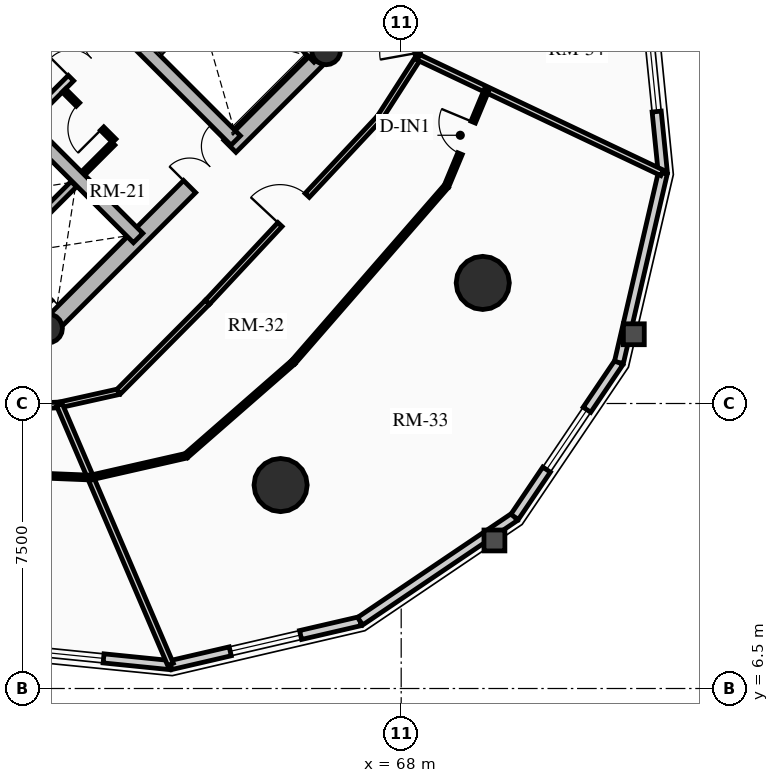
"""IFC4 building model, lengths in metres.
Left out: names, types, materials, properties, quantities, classifications, styles, units other than length and angle.
Written with IfcOpenShell. Run it as: python <this file> out.ifc"""

import sys

from ifc_helpers import new_model, si_unit, direction, frame, frame_2d, origin, origin_2d, place, context, subcontext, project, spatial, rectangle, circle, hollow_circle, extrude, source, transform, mapped, element, fill, save


model = new_model("IFC4")
c1 = context("Model", 3, precision=1e-05, world=origin(), true_north=direction((0.0, 1.0)))
c2 = subcontext(c1, "Body", "Model", "MODEL_VIEW")
j1 = project(units=[si_unit("LENGTHUNIT", "METRE"), si_unit("PLANEANGLEUNIT", "RADIAN")], contexts=[c1])
p1 = place(None, origin())
s1 = spatial("IfcSite", under=j1, at=p1, CompositionType="ELEMENT")
p2 = place(p1, origin())
s2 = spatial("IfcBuilding", under=s1, at=p2, CompositionType="ELEMENT")
p3 = place(p2, frame((0.0, 0.0, 107.98)))
s3 = spatial("IfcBuildingStorey", under=s2, at=p3, CompositionType="ELEMENT", Elevation=107.98)
for number, where, z_axis, x_axis in (
    (1, (58.737, 15.697, 0.0), (0.0, 0.0, 1.0), (-0.707, 0.707, 0.0)),
    (2, (66.303, 23.263, 0.0), (0.0, 0.0, 1.0), (-0.707, 0.707, 0.0)),
):
    element("IfcWall", number, at=place(p3, frame(where, z_axis=z_axis, x_axis=x_axis)), inside=s3, PredefinedType="SHEAR", context=c2, shape_type="SweptSolid", body=[
        extrude(rectangle(XDim=14.2, YDim=0.45, at=frame_2d((7.1, 0.0))), origin(), (0.0, 0.0, 1.0), 2.91),
    ])
p4 = place(p3, frame((58.578, 15.856, 0.0), z_axis=(0.0, 0.0, 1.0), x_axis=(0.707106781187, 0.707106781187, 0.0)))
e3 = element("IfcWall", 3, at=p4, inside=s3, PredefinedType="SHEAR", context=c2, shape_type="SweptSolid", body=[
    extrude(rectangle(XDim=10.7, YDim=0.45, at=frame_2d((5.35, 0.0))), origin(), (0.0, 0.0, 1.0), 2.91),
])
m1 = source(origin(), c2, "Body", "SweptSolid", [
    extrude(rectangle(XDim=1.5, YDim=2.02, at=frame_2d((0.75, 1.01))), frame((0.0, 0.235, 0.0), z_axis=(0.0, -1.0, 0.0), x_axis=(1.0, 0.0, 0.0)), (0.0, 0.0, 1.0), 0.47),
])
p5 = place(p4, frame((5.45, 0.0, 0.0)))
e4 = element("IfcOpeningElement", 4, at=p5, cuts=e3, PredefinedType="OPENING", context=c2, shape_type="MappedRepresentation", body=[
    mapped(m1, transform((0.0, 0.0, 0.0), x_axis=(1.0, 0.0, 0.0), y_axis=(0.0, 1.0, 0.0), z_axis=(0.0, 0.0, 1.0), scale=1.0)),
])
p6 = place(p3, frame((61.078, 18.355, 0.0), z_axis=(0.0, 0.0, 1.0), x_axis=(-0.707106781187, 0.707106781187, 0.0)))
e5 = element("IfcWall", 5, at=p6, inside=s3, PredefinedType="SHEAR", context=c2, shape_type="SweptSolid", body=[
    extrude(rectangle(XDim=13.75, YDim=0.35, at=frame_2d((6.875, 0.0))), origin(), (0.0, 0.0, 1.0), 2.91),
])
m2 = source(origin(), c2, "Body", "SweptSolid", [
    extrude(rectangle(XDim=1.1, YDim=2.015, at=frame_2d((0.55, 1.007))), frame((0.0, 0.185, 0.0), z_axis=(0.0, -1.0, 0.0), x_axis=(1.0, 0.0, 0.0)), (0.0, 0.0, 1.0), 0.37),
])
p7 = place(p6, frame((4.875, 0.0, 0.0)))
e6 = element("IfcOpeningElement", 6, at=p7, cuts=e5, PredefinedType="OPENING", context=c2, shape_type="MappedRepresentation", body=[
    mapped(m2, transform((0.0, 0.0, 0.0), x_axis=(1.0, 0.0, 0.0), y_axis=(0.0, 1.0, 0.0), z_axis=(0.0, 0.0, 1.0), scale=1.0)),
])
m3 = source(origin(), c2, "Body", "SweptSolid", [
    extrude(rectangle(XDim=1.15, YDim=2.02, at=frame_2d((0.575, 1.01))), frame((0.0, 0.185, 0.0), z_axis=(0.0, -1.0, 0.0), x_axis=(1.0, 0.0, 0.0)), (0.0, 0.0, 1.0), 0.37),
])
p8 = place(p6, frame((7.295, 0.0, 0.0)))
e7 = element("IfcOpeningElement", 7, at=p8, cuts=e5, PredefinedType="OPENING", context=c2, shape_type="MappedRepresentation", body=[
    mapped(m3, transform((0.0, 0.0, 0.0), x_axis=(1.0, 0.0, 0.0), y_axis=(0.0, 1.0, 0.0), z_axis=(0.0, 0.0, 1.0), scale=1.0)),
])
p9 = place(p3, frame((63.645, 20.922, 0.0), z_axis=(0.0, 0.0, 1.0), x_axis=(-0.707106781187, 0.707106781187, 0.0)))
e8 = element("IfcWall", 8, at=p9, inside=s3, PredefinedType="SHEAR", context=c2, shape_type="SweptSolid", body=[
    extrude(rectangle(XDim=13.75, YDim=0.35, at=frame_2d((6.875, 0.0))), origin(), (0.0, 0.0, 1.0), 2.91),
])
p10 = place(p9, frame((10.0, 0.0, 0.0)))
e9 = element("IfcOpeningElement", 9, at=p10, cuts=e8, PredefinedType="OPENING", context=c2, shape_type="MappedRepresentation", body=[
    mapped(m2, transform((0.0, 0.0, 0.0), x_axis=(1.0, 0.0, 0.0), y_axis=(0.0, 1.0, 0.0), z_axis=(0.0, 0.0, 1.0), scale=1.0)),
])
p11 = place(p9, frame((12.0, 0.0, 0.0)))
e10 = element("IfcOpeningElement", 10, at=p11, cuts=e8, PredefinedType="OPENING", context=c2, shape_type="MappedRepresentation", body=[
    mapped(m2, transform((0.0, 0.0, 0.0), x_axis=(1.0, 0.0, 0.0), y_axis=(0.0, 1.0, 0.0), z_axis=(0.0, 0.0, 1.0), scale=1.0)),
])
p12 = place(p9, frame((5.305, 0.0, 0.0)))
e11 = element("IfcOpeningElement", 11, at=p12, cuts=e8, PredefinedType="OPENING", context=c2, shape_type="MappedRepresentation", body=[
    mapped(m3, transform((0.0, 0.0, 0.0), x_axis=(1.0, 0.0, 0.0), y_axis=(0.0, 1.0, 0.0), z_axis=(0.0, 0.0, 1.0), scale=1.0)),
])
p13 = place(p3, frame((65.83, 23.107, 0.0), z_axis=(0.0, 0.0, 1.0), x_axis=(-0.707088616009, 0.707124945897, 0.0)))
e12 = element("IfcWall", 12, at=p13, inside=s3, PredefinedType="SHEAR", context=c2, shape_type="SweptSolid", body=[
    extrude(rectangle(XDim=6.72, YDim=0.35, at=frame_2d((3.36, 0.0))), origin(), (0.0, 0.0, 1.0), 2.91),
])
for number, where, z_axis, x_axis in (
    (13, (58.706, 15.976, 0.0), (0.0, 0.0, 1.0), (0.707, 0.707, 0.0)),
    (14, (66.024, 23.294, 0.0), (0.0, 0.0, 1.0), (0.707, 0.707, 0.0)),
):
    element("IfcColumn", number, at=place(p3, frame(where, z_axis=z_axis, x_axis=x_axis)), inside=s3, PredefinedType="COLUMN", context=c2, shape_type="SweptSolid", body=[
        extrude(hollow_circle(Radius=0.38, WallThickness=0.032, at=origin_2d()), origin(), (0.0, 0.0, 1.0), 2.91),
    ])
for number, where, z_axis, x_axis in (
    (15, (64.827, 11.854, 0.0), (0.0, 0.0, 1.0), (1.0, 0.0, 0.0)),
    (16, (70.146, 17.173, 0.0), (0.0, 0.0, 1.0), (1.0, 0.0, 0.0)),
):
    element("IfcColumn", number, at=place(p3, frame(where, z_axis=z_axis, x_axis=x_axis)), inside=s3, PredefinedType="USERDEFINED", context=c2, shape_type="SweptSolid", body=[
        extrude(circle(Radius=0.7, at=origin_2d()), origin(), (0.0, 0.0, 1.0), 2.91),
    ])
p14 = place(p3, frame((61.933, 7.115, 0.0), z_axis=(0.0, 0.0, 1.0), x_axis=(-0.994971754311, 0.10015591906, 0.0)))
e17 = element("IfcWall", 17, at=p14, inside=s3, PredefinedType="SOLIDWALL", context=c2, shape_type="SweptSolid", body=[
    extrude(rectangle(XDim=5.448, YDim=0.24, at=frame_2d((2.724, 0.0))), origin(), (0.0, 0.0, 1.0), 2.179),
])
m4 = source(origin(), c2, "Body", "SweptSolid", [
    extrude(rectangle(XDim=1.9, YDim=1.35, at=frame_2d((0.95, 0.675))), frame((0.0, 0.13, 0.0), z_axis=(0.0, -1.0, 0.0), x_axis=(1.0, 0.0, 0.0)), (0.0, 0.0, 1.0), 0.26),
])
p15 = place(p14, frame((1.774, 0.0, 0.65)))
e18 = element("IfcOpeningElement", 18, at=p15, cuts=e17, PredefinedType="OPENING", context=c2, shape_type="MappedRepresentation", body=[
    mapped(m4, transform((0.0, 0.0, 0.0), x_axis=(1.0, 0.0, 0.0), y_axis=(0.0, 1.0, 0.0), z_axis=(0.0, 0.0, 1.0), scale=1.0)),
])
p16 = place(p3, frame((66.92, 8.271, 0.0), z_axis=(0.0, 0.0, 1.0), x_axis=(-0.974165631126, -0.225834725257, 0.0)))
e19 = element("IfcWall", 19, at=p16, inside=s3, PredefinedType="SOLIDWALL", context=c2, shape_type="SweptSolid", body=[
    extrude(rectangle(XDim=5.119, YDim=0.24, at=frame_2d((2.56, 0.0))), origin(), (0.0, 0.0, 1.0), 2.179),
])
p17 = place(p16, frame((1.609, 0.0, 0.65)))
e20 = element("IfcOpeningElement", 20, at=p17, cuts=e19, PredefinedType="OPENING", context=c2, shape_type="MappedRepresentation", body=[
    mapped(m4, transform((0.0, 0.0, 0.0), x_axis=(1.0, 0.0, 0.0), y_axis=(0.0, 1.0, 0.0), z_axis=(0.0, 0.0, 1.0), scale=1.0)),
])
p18 = place(p3, frame((70.985, 11.015, 0.0), z_axis=(0.0, 0.0, 1.0), x_axis=(-0.828781148131, -0.559572880421, 0.0)))
e21 = element("IfcWall", 21, at=p18, inside=s3, PredefinedType="SOLIDWALL", context=c2, shape_type="SweptSolid", body=[
    extrude(rectangle(XDim=4.905, YDim=0.24, at=frame_2d((2.452, 0.0))), origin(), (0.0, 0.0, 1.0), 2.179),
])
p19 = place(p3, frame((73.729, 15.08, 0.0), z_axis=(0.0, 0.0, 1.0), x_axis=(-0.559572880421, -0.828781148131, 0.0)))
e22 = element("IfcWall", 22, at=p19, inside=s3, PredefinedType="SOLIDWALL", context=c2, shape_type="SweptSolid", body=[
    extrude(rectangle(XDim=4.905, YDim=0.24, at=frame_2d((2.452, 0.0))), origin(), (0.0, 0.0, 1.0), 2.179),
])
p20 = place(p19, frame((1.502, 0.0, 0.65)))
e23 = element("IfcOpeningElement", 23, at=p20, cuts=e22, PredefinedType="OPENING", context=c2, shape_type="MappedRepresentation", body=[
    mapped(m4, transform((0.0, 0.0, 0.0), x_axis=(1.0, 0.0, 0.0), y_axis=(0.0, 1.0, 0.0), z_axis=(0.0, 0.0, 1.0), scale=1.0)),
])
p21 = place(p3, frame((74.885, 20.067, 0.0), z_axis=(0.0, 0.0, 1.0), x_axis=(-0.225834725257, -0.974165631126, 0.0)))
e24 = element("IfcWall", 24, at=p21, inside=s3, PredefinedType="SOLIDWALL", context=c2, shape_type="SweptSolid", body=[
    extrude(rectangle(XDim=5.119, YDim=0.24, at=frame_2d((2.56, 0.0))), origin(), (0.0, 0.0, 1.0), 2.179),
])
p22 = place(p3, frame((74.339, 25.487, 0.0), z_axis=(0.0, 0.0, 1.0), x_axis=(0.10015591906, -0.994971754311, 0.0)))
e25 = element("IfcWall", 25, at=p22, inside=s3, PredefinedType="SOLIDWALL", context=c2, shape_type="SweptSolid", body=[
    extrude(rectangle(XDim=5.448, YDim=0.24, at=frame_2d((2.724, 0.0))), origin(), (0.0, 0.0, 1.0), 2.179),
])
m5 = source(origin(), c2, "Body", "SweptSolid", [
    extrude(rectangle(XDim=2.2, YDim=1.35, at=frame_2d((1.1, 0.675))), frame((0.0, 0.13, 0.0), z_axis=(0.0, -1.0, 0.0), x_axis=(1.0, 0.0, 0.0)), (0.0, 0.0, 1.0), 0.26),
])
p23 = place(p22, frame((1.624, 0.0, 0.65)))
e26 = element("IfcOpeningElement", 26, at=p23, cuts=e25, PredefinedType="OPENING", context=c2, shape_type="MappedRepresentation", body=[
    mapped(m5, transform((0.0, 0.0, 0.0), x_axis=(1.0, 0.0, 0.0), y_axis=(0.0, 1.0, 0.0), z_axis=(0.0, 0.0, 1.0), scale=1.0)),
])
p24 = place(p3, frame((57.284, 17.673, 0.0), z_axis=(0.0, 0.0, 1.0), x_axis=(0.707147878904, 0.70706568108, 0.0)))
e27 = element("IfcWall", 27, at=p24, inside=s3, PredefinedType="SHEAR", context=c2, shape_type="SweptSolid", body=[
    extrude(rectangle(XDim=2.97, YDim=0.2, at=frame_2d((1.485, 0.0))), origin(), (0.0, 0.0, 1.0), 2.91),
])
p25 = place(p3, frame((58.214, 21.467, 0.0), z_axis=(0.0, 0.0, 1.0), x_axis=(0.707106781187, 0.707106781187, 0.0)))
e28 = element("IfcWall", 28, at=p25, inside=s3, PredefinedType="PARTITIONING", context=c2, shape_type="SweptSolid", body=[
    extrude(rectangle(XDim=3.28, YDim=0.2, at=frame_2d((1.64, 0.0))), origin(), (0.0, 0.0, 1.0), 2.655),
])
m6 = source(origin(), c2, "Body", "SweptSolid", [
    extrude(rectangle(XDim=1.5, YDim=2.02, at=frame_2d((0.75, 1.01))), frame((0.0, 0.11, 0.0), z_axis=(0.0, -1.0, 0.0), x_axis=(1.0, 0.0, 0.0)), (0.0, 0.0, 1.0), 0.22),
])
p26 = place(p25, frame((1.55, 0.0, 0.0)))
e29 = element("IfcOpeningElement", 29, at=p26, cuts=e28, PredefinedType="OPENING", context=c2, shape_type="MappedRepresentation", body=[
    mapped(m6, transform((0.0, 0.0, 0.0), x_axis=(1.0, 0.0, 0.0), y_axis=(0.0, 1.0, 0.0), z_axis=(0.0, 0.0, 1.0), scale=1.0)),
])
p27 = place(p3, frame((60.448, 20.915, 0.0), z_axis=(0.0, 0.0, 1.0), x_axis=(-0.707106781187, 0.707106781187, 0.0)))
e30 = element("IfcWall", 30, at=p27, inside=s3, PredefinedType="PARTITIONING", context=c2, shape_type="SweptSolid", body=[
    extrude(rectangle(XDim=1.87, YDim=0.125, at=frame_2d((0.935, 0.0))), origin(), (0.0, 0.0, 1.0), 2.655),
])
m7 = source(origin(), c2, "Body", "SweptSolid", [
    extrude(rectangle(XDim=0.9, YDim=2.005, at=frame_2d((0.45, 1.002))), frame((0.0, 0.073, 0.0), z_axis=(0.0, -1.0, 0.0), x_axis=(1.0, 0.0, 0.0)), (0.0, 0.0, 1.0), 0.145),
])
p28 = place(p27, frame((0.45, 0.0, 0.0)))
e31 = element("IfcOpeningElement", 31, at=p28, cuts=e30, PredefinedType="OPENING", context=c2, shape_type="MappedRepresentation", body=[
    mapped(m7, transform((0.0, 0.0, 0.0), x_axis=(1.0, 0.0, 0.0), y_axis=(0.0, 1.0, 0.0), z_axis=(0.0, 0.0, 1.0), scale=1.0)),
])
p29 = place(p3, frame((59.643, 20.066, 0.0), z_axis=(0.0, 0.0, 1.0), x_axis=(0.707106781187, 0.707106781187, 0.0)))
e32 = element("IfcWall", 32, at=p29, inside=s3, PredefinedType="PARTITIONING", context=c2, shape_type="SweptSolid", body=[
    extrude(rectangle(XDim=1.1, YDim=0.125, at=frame_2d((0.55, 0.0))), origin(), (0.0, 0.0, 1.0), 2.655),
])
p30 = place(p3, frame((57.511, 13.897, 0.0), z_axis=(0.0, 0.0, 1.0), x_axis=(0.999024538494, 0.044158481476, 0.0)))
e33 = element("IfcWall", 33, at=p30, inside=s3, PredefinedType="PARTITIONING", context=c2, shape_type="SweptSolid", body=[
    extrude(rectangle(XDim=1.498, YDim=0.15, at=frame_2d((0.749, 0.0))), origin(), (0.0, 0.0, 1.0), 2.225),
])
p31 = place(p3, frame((59.008, 13.963, 0.0), z_axis=(0.0, 0.0, 1.0), x_axis=(0.976020856791, 0.21767702476, 0.0)))
e34 = element("IfcWall", 34, at=p31, inside=s3, PredefinedType="PARTITIONING", context=c2, shape_type="SweptSolid", body=[
    extrude(rectangle(XDim=1.593, YDim=0.15, at=frame_2d((0.796, 0.0))), origin(), (0.0, 0.0, 1.0), 2.225),
])
p32 = place(p3, frame((60.562, 14.31, 0.0), z_axis=(0.0, 0.0, 1.0), x_axis=(0.704566236161, 0.709638230975, 0.0)))
e35 = element("IfcWall", 35, at=p32, inside=s3, PredefinedType="PARTITIONING", context=c2, shape_type="SweptSolid", body=[
    extrude(rectangle(XDim=3.321, YDim=0.15, at=frame_2d((1.661, 0.0))), origin(), (0.0, 0.0, 1.0), 2.225),
])
p33 = place(p3, frame((62.903, 16.667, 0.0), z_axis=(0.0, 0.0, 1.0), x_axis=(0.682371947497, 0.731005147225, 0.0)))
e36 = element("IfcWall", 36, at=p33, inside=s3, PredefinedType="PARTITIONING", context=c2, shape_type="SweptSolid", body=[
    extrude(rectangle(XDim=6.642, YDim=0.15, at=frame_2d((3.321, 0.0))), origin(), (0.0, 0.0, 1.0), 2.225),
])
m8 = source(origin(), c2, "Body", "SweptSolid", [
    extrude(rectangle(XDim=1.05, YDim=2.015, at=frame_2d((0.525, 1.007))), frame((0.0, 0.085, 0.0), z_axis=(0.0, -1.0, 0.0), x_axis=(1.0, 0.0, 0.0)), (0.0, 0.0, 1.0), 0.17),
])
p34 = place(p33, frame((2.796, 0.0, 0.0)))
e37 = element("IfcOpeningElement", 37, at=p34, cuts=e36, PredefinedType="OPENING", context=c2, shape_type="MappedRepresentation", body=[
    mapped(m8, transform((0.0, 0.0, 0.0), x_axis=(1.0, 0.0, 0.0), y_axis=(0.0, 1.0, 0.0), z_axis=(0.0, 0.0, 1.0), scale=1.0)),
])
p35 = place(p3, frame((67.435, 21.521, 0.0), z_axis=(0.0, 0.0, 1.0), x_axis=(0.540777197838, 0.841165870859, 0.0)))
e38 = element("IfcWall", 38, at=p35, inside=s3, PredefinedType="PARTITIONING", context=c2, shape_type="SweptSolid", body=[
    extrude(rectangle(XDim=1.888, YDim=0.15, at=frame_2d((0.944, 0.0))), origin(), (0.0, 0.0, 1.0), 2.225),
])
p36 = place(p3, frame((68.456, 23.11, 0.0), z_axis=(0.0, 0.0, 1.0), x_axis=(-0.1772522795, 0.984165448191, 0.0)))
e39 = element("IfcWall", 39, at=p36, inside=s3, PredefinedType="PARTITIONING", context=c2, shape_type="SweptSolid", body=[
    extrude(rectangle(XDim=1.382, YDim=0.15, at=frame_2d((0.691, 0.0))), origin(), (0.0, 0.0, 1.0), 2.225),
])
m9 = source(origin(), c2, "Body", "SweptSolid", [
    extrude(rectangle(XDim=1.0, YDim=2.015, at=frame_2d((0.5, 1.007))), frame((0.0, 0.085, 0.0), z_axis=(0.0, -1.0, 0.0), x_axis=(1.0, 0.0, 0.0)), (0.0, 0.0, 1.0), 0.17),
])
p37 = place(p36, frame((0.12, 0.0, 0.0)))
e40 = element("IfcOpeningElement", 40, at=p37, cuts=e39, PredefinedType="OPENING", context=c2, shape_type="MappedRepresentation", body=[
    mapped(m9, transform((0.0, 0.0, 0.0), x_axis=(1.0, 0.0, 0.0), y_axis=(0.0, 1.0, 0.0), z_axis=(0.0, 0.0, 1.0), scale=1.0)),
])
p38 = place(p3, frame((59.008, 13.963, 0.0), z_axis=(0.0, 0.0, 1.0), x_axis=(0.393439207333, -0.919350635032, 0.0)))
e41 = element("IfcWall", 41, at=p38, inside=s3, PredefinedType="PARTITIONING", context=c2, shape_type="SweptSolid", body=[
    extrude(rectangle(XDim=7.427, YDim=0.16, at=frame_2d((3.713, 0.0))), origin(), (0.0, 0.0, 1.0), 2.179),
])
p39 = place(p3, frame((68.456, 23.11, 0.0), z_axis=(0.0, 0.0, 1.0), x_axis=(0.903539425667, -0.428504966442, 0.0)))
e42 = element("IfcWall", 42, at=p39, inside=s3, PredefinedType="PARTITIONING", context=c2, shape_type="SweptSolid", body=[
    extrude(rectangle(XDim=7.094, YDim=0.16, at=frame_2d((3.547, 0.0))), origin(), (0.0, 0.0, 1.0), 2.179),
])
p40 = place(p3, frame((57.233, 12.156, 0.0), z_axis=(0.0, 0.0, 1.0), x_axis=(0.999181916557, -0.040441286156, 0.0)))
e43 = element("IfcWall", 43, at=p40, inside=s3, PredefinedType="PARTITIONING", context=c2, shape_type="SweptSolid", body=[
    extrude(rectangle(XDim=2.596, YDim=0.125, at=frame_2d((1.298, 0.0))), origin(), (0.0, 0.0, 1.0), 2.655),
])
p41 = place(p3, frame((59.826, 12.051, 0.0), z_axis=(0.0, 0.0, 1.0), x_axis=(0.975009915085, 0.222161350116, 0.0)))
e44 = element("IfcWall", 44, at=p41, inside=s3, PredefinedType="PARTITIONING", context=c2, shape_type="SweptSolid", body=[
    extrude(rectangle(XDim=2.578, YDim=0.125, at=frame_2d((1.289, 0.0))), origin(), (0.0, 0.0, 1.0), 2.225),
])
p42 = place(p3, frame((62.34, 12.624, 0.0), z_axis=(0.0, 0.0, 1.0), x_axis=(0.753169839919, 0.657826110941, 0.0)))
e45 = element("IfcWall", 45, at=p42, inside=s3, PredefinedType="PARTITIONING", context=c2, shape_type="SweptSolid", body=[
    extrude(rectangle(XDim=3.746, YDim=0.125, at=frame_2d((1.873, 0.0))), origin(), (0.0, 0.0, 1.0), 2.225),
])
p43 = place(p3, frame((65.162, 15.088, 0.0), z_axis=(0.0, 0.0, 1.0), x_axis=(0.656379509785, 0.754430871011, 0.0)))
e46 = element("IfcWall", 46, at=p43, inside=s3, PredefinedType="PARTITIONING", context=c2, shape_type="SweptSolid", body=[
    extrude(rectangle(XDim=6.14, YDim=0.125, at=frame_2d((3.07, 0.0))), origin(), (0.0, 0.0, 1.0), 2.225),
])
p44 = place(p3, frame((69.192, 19.72, 0.0), z_axis=(0.0, 0.0, 1.0), x_axis=(0.384899070029, 0.922958669655, 0.0)))
e47 = element("IfcWall", 47, at=p44, inside=s3, PredefinedType="PARTITIONING", context=c2, shape_type="SweptSolid", body=[
    extrude(rectangle(XDim=2.75, YDim=0.125, at=frame_2d((1.375, 0.0))), origin(), (0.0, 0.0, 1.0), 2.179),
])
p45 = place(p44, frame((0.925, 0.0, 0.0)))
e48 = element("IfcOpeningElement", 48, at=p45, cuts=e47, PredefinedType="OPENING", context=c2, shape_type="MappedRepresentation", body=[
    mapped(m7, transform((0.0, 0.0, 0.0), x_axis=(1.0, 0.0, 0.0), y_axis=(0.0, 1.0, 0.0), z_axis=(0.0, 0.0, 1.0), scale=1.0)),
])
m10 = source(origin(), c2, "Body", "SweptSolid", [
    extrude(rectangle(XDim=1.9, YDim=1.35, at=frame_2d((0.95, 0.675))), frame((0.0, 0.03, 0.0), z_axis=(0.0, -1.0, 0.0), x_axis=(1.0, 0.0, 0.0)), (0.0, 0.0, 1.0), 0.06),
])
p46 = place(p15, origin())
e49 = element("IfcWindow", 49, at=p46, inside=s3, PartitioningType="DOUBLE_PANEL_VERTICAL", PredefinedType="WINDOW", context=c2, shape_type="MappedRepresentation", body=[
    mapped(m10, transform((0.0, 0.0, 0.0), x_axis=(1.0, 0.0, 0.0), y_axis=(0.0, 1.0, 0.0), z_axis=(0.0, 0.0, 1.0), scale=1.0)),
])
fill(e18, e49)
p47 = place(p17, origin())
e50 = element("IfcWindow", 50, at=p47, inside=s3, PartitioningType="DOUBLE_PANEL_VERTICAL", PredefinedType="WINDOW", context=c2, shape_type="MappedRepresentation", body=[
    mapped(m10, transform((0.0, 0.0, 0.0), x_axis=(1.0, 0.0, 0.0), y_axis=(0.0, 1.0, 0.0), z_axis=(0.0, 0.0, 1.0), scale=1.0)),
])
fill(e20, e50)
p48 = place(p20, origin())
e51 = element("IfcWindow", 51, at=p48, inside=s3, PartitioningType="DOUBLE_PANEL_VERTICAL", PredefinedType="WINDOW", context=c2, shape_type="MappedRepresentation", body=[
    mapped(m10, transform((0.0, 0.0, 0.0), x_axis=(1.0, 0.0, 0.0), y_axis=(0.0, 1.0, 0.0), z_axis=(0.0, 0.0, 1.0), scale=1.0)),
])
fill(e23, e51)
m11 = source(origin(), c2, "Body", "SweptSolid", [
    extrude(rectangle(XDim=2.2, YDim=1.35, at=frame_2d((1.1, 0.675))), frame((0.0, 0.03, 0.0), z_axis=(0.0, -1.0, 0.0), x_axis=(1.0, 0.0, 0.0)), (0.0, 0.0, 1.0), 0.06),
])
p49 = place(p23, origin())
e52 = element("IfcWindow", 52, at=p49, inside=s3, PartitioningType="DOUBLE_PANEL_VERTICAL", PredefinedType="WINDOW", context=c2, shape_type="MappedRepresentation", body=[
    mapped(m11, transform((0.0, 0.0, 0.0), x_axis=(1.0, 0.0, 0.0), y_axis=(0.0, 1.0, 0.0), z_axis=(0.0, 0.0, 1.0), scale=1.0)),
])
fill(e26, e52)
m12 = source(origin(), c2, "Body", "SweptSolid", [
    extrude(rectangle(XDim=1.5, YDim=2.02, at=frame_2d((0.75, 1.01))), frame((0.0, 0.025, 0.0), z_axis=(0.0, -1.0, 0.0), x_axis=(1.0, 0.0, 0.0)), (0.0, 0.0, 1.0), 0.05),
])
p50 = place(p5, origin())
e53 = element("IfcDoor", 53, at=p50, inside=s3, OperationType="DOUBLE_DOOR_SINGLE_SWING", PredefinedType="DOOR", context=c2, shape_type="MappedRepresentation", body=[
    mapped(m12, transform((0.0, 0.0, 0.0), x_axis=(1.0, 0.0, 0.0), y_axis=(0.0, 1.0, 0.0), z_axis=(0.0, 0.0, 1.0), scale=1.0)),
])
fill(e4, e53)
p51 = place(p26, origin())
e54 = element("IfcDoor", 54, at=p51, inside=s3, OperationType="DOUBLE_DOOR_SINGLE_SWING", PredefinedType="DOOR", context=c2, shape_type="MappedRepresentation", body=[
    mapped(m12, transform((0.0, 0.0, 0.0), x_axis=(1.0, 0.0, 0.0), y_axis=(0.0, 1.0, 0.0), z_axis=(0.0, 0.0, 1.0), scale=1.0)),
])
fill(e29, e54)
m13 = source(origin(), c2, "Body", "SweptSolid", [
    extrude(rectangle(XDim=0.9, YDim=2.005, at=frame_2d((0.45, 1.002))), frame((0.0, 0.025, 0.0), z_axis=(0.0, -1.0, 0.0), x_axis=(1.0, 0.0, 0.0)), (0.0, 0.0, 1.0), 0.05),
])
p52 = place(p28, origin())
e55 = element("IfcDoor", 55, at=p52, inside=s3, OperationType="SINGLE_SWING_LEFT", PredefinedType="DOOR", context=c2, shape_type="MappedRepresentation", body=[
    mapped(m13, transform((0.0, 0.0, 0.0), x_axis=(1.0, 0.0, 0.0), y_axis=(0.0, 1.0, 0.0), z_axis=(0.0, 0.0, 1.0), scale=1.0)),
])
fill(e31, e55)
m14 = source(origin(), c2, "Body", "SweptSolid", [
    extrude(rectangle(XDim=1.05, YDim=2.015, at=frame_2d((0.525, 1.007))), frame((0.0, 0.025, 0.0), z_axis=(0.0, -1.0, 0.0), x_axis=(1.0, 0.0, 0.0)), (0.0, 0.0, 1.0), 0.05),
])
p53 = place(p34, origin())
e56 = element("IfcDoor", 56, at=p53, inside=s3, OperationType="SINGLE_SWING_LEFT", PredefinedType="DOOR", context=c2, shape_type="MappedRepresentation", body=[
    mapped(m14, transform((0.0, 0.0, 0.0), x_axis=(1.0, 0.0, 0.0), y_axis=(0.0, 1.0, 0.0), z_axis=(0.0, 0.0, 1.0), scale=1.0)),
])
fill(e37, e56)
p54 = place(p45, origin())
e57 = element("IfcDoor", 57, at=p54, inside=s3, OperationType="SINGLE_SWING_RIGHT", PredefinedType="DOOR", context=c2, shape_type="MappedRepresentation", body=[
    mapped(m13, transform((0.0, 0.0, 0.0), x_axis=(1.0, 0.0, 0.0), y_axis=(0.0, 1.0, 0.0), z_axis=(0.0, 0.0, 1.0), scale=1.0)),
])
fill(e48, e57)
m15 = source(origin(), c2, "Body", "SweptSolid", [
    extrude(rectangle(XDim=1.0, YDim=2.015, at=frame_2d((0.5, 1.007))), frame((0.0, 0.025, 0.0), z_axis=(0.0, -1.0, 0.0), x_axis=(1.0, 0.0, 0.0)), (0.0, 0.0, 1.0), 0.05),
])
p55 = place(p37, origin())
e58 = element("IfcDoor", 58, at=p55, inside=s3, OperationType="SINGLE_SWING_LEFT", PredefinedType="DOOR", context=c2, shape_type="MappedRepresentation", body=[
    mapped(m15, transform((0.0, 0.0, 0.0), x_axis=(1.0, 0.0, 0.0), y_axis=(0.0, 1.0, 0.0), z_axis=(0.0, 0.0, 1.0), scale=1.0)),
])
fill(e40, e58)
save(model, sys.argv[1])
